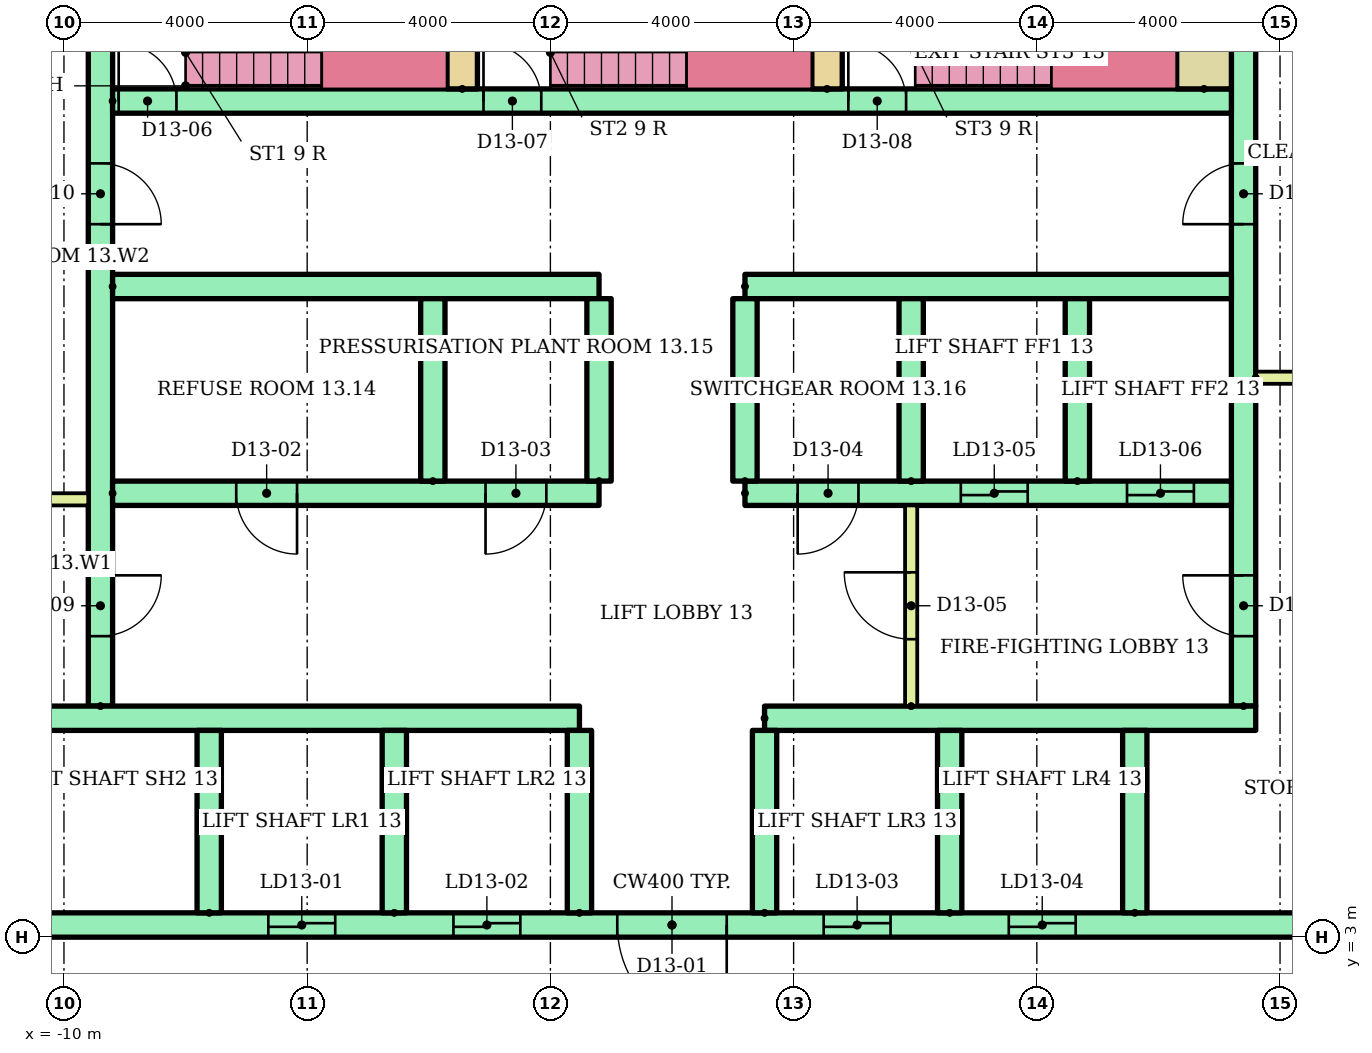
"""IFC4 building model, lengths in metres.
Left out: names, types, materials, properties, quantities, classifications, styles, units other than length and angle.
Written with IfcOpenShell. Run it as: python <this file> out.ifc"""

import sys

from ifc_helpers import new_model, si_unit, direction, frame, frame_2d, origin, place, context, subcontext, project, spatial, rectangle, extrude, element, fill, save


model = new_model("IFC4")
c1 = context("Model", 3, precision=1e-05, world=origin(), true_north=direction((0.0, 1.0)))
c2 = subcontext(c1, "Body", "Model", "MODEL_VIEW")
j1 = project(units=[si_unit("LENGTHUNIT", "METRE"), si_unit("PLANEANGLEUNIT", "RADIAN")], contexts=[c1])
p1 = place(None, origin())
s1 = spatial("IfcSite", under=j1, at=p1, CompositionType="ELEMENT")
p2 = place(p1, origin())
s2 = spatial("IfcBuilding", under=s1, at=p2, CompositionType="ELEMENT")
p3 = place(p2, frame((0.0, 0.0, 51.2)))
s3 = spatial("IfcBuildingStorey", under=s2, at=p3, CompositionType="ELEMENT", Elevation=51.2)
p4 = place(p3, frame((-9.4, 6.8, 0.0), z_axis=(0.0, 0.0, 1.0), x_axis=(0.0, 1.0, 0.0)))
e1 = element("IfcWall", 1, at=p4, inside=s3, PredefinedType="SHEAR", context=c2, shape_type="SweptSolid", body=[
    extrude(rectangle(XDim=12.7, YDim=0.4, at=frame_2d((6.35, 0.0))), origin(), (0.0, 0.0, 1.0), 2.92),
])
p5 = place(p4, frame((1.15, 0.0, 0.0)))
e2 = element("IfcOpeningElement", 2, at=p5, cuts=e1, PredefinedType="OPENING", context=c2, shape_type="SweptSolid", body=[
    extrude(rectangle(XDim=1.0, YDim=2.1, at=frame_2d((0.5, 1.05))), frame((0.0, 0.21, 0.0), z_axis=(0.0, -1.0, 0.0), x_axis=(1.0, 0.0, 0.0)), (0.0, 0.0, 1.0), 0.42),
])
p6 = place(p4, frame((7.925, 0.0, 0.0)))
e3 = element("IfcOpeningElement", 3, at=p6, cuts=e1, PredefinedType="OPENING", context=c2, shape_type="SweptSolid", body=[
    extrude(rectangle(XDim=1.0, YDim=2.1, at=frame_2d((0.5, 1.05))), frame((0.0, 0.21, 0.0), z_axis=(0.0, -1.0, 0.0), x_axis=(1.0, 0.0, 0.0)), (0.0, 0.0, 1.0), 0.42),
])
p7 = place(p3, frame((9.4, 6.8, 0.0), z_axis=(0.0, 0.0, 1.0), x_axis=(0.0, 1.0, 0.0)))
e4 = element("IfcWall", 4, at=p7, inside=s3, PredefinedType="SHEAR", context=c2, shape_type="SweptSolid", body=[
    extrude(rectangle(XDim=12.7, YDim=0.4, at=frame_2d((6.35, 0.0))), origin(), (0.0, 0.0, 1.0), 2.92),
])
p8 = place(p7, frame((1.15, 0.0, 0.0)))
e5 = element("IfcOpeningElement", 5, at=p8, cuts=e4, PredefinedType="OPENING", context=c2, shape_type="SweptSolid", body=[
    extrude(rectangle(XDim=1.0, YDim=2.1, at=frame_2d((0.5, 1.05))), frame((0.0, 0.21, 0.0), z_axis=(0.0, -1.0, 0.0), x_axis=(1.0, 0.0, 0.0)), (0.0, 0.0, 1.0), 0.42),
])
p9 = place(p7, frame((7.925, 0.0, 0.0)))
e6 = element("IfcOpeningElement", 6, at=p9, cuts=e4, PredefinedType="OPENING", context=c2, shape_type="SweptSolid", body=[
    extrude(rectangle(XDim=1.0, YDim=2.1, at=frame_2d((0.5, 1.05))), frame((0.0, 0.21, 0.0), z_axis=(0.0, -1.0, 0.0), x_axis=(1.0, 0.0, 0.0)), (0.0, 0.0, 1.0), 0.42),
])
p10 = place(p3, frame((-13.5, 3.2, 0.0)))
e7 = element("IfcWall", 7, at=p10, inside=s3, PredefinedType="SHEAR", context=c2, shape_type="SweptSolid", body=[
    extrude(rectangle(XDim=27.0, YDim=0.4, at=frame_2d((13.5, 0.0))), origin(), (0.0, 0.0, 1.0), 2.92),
])
p11 = place(p10, frame((6.861, 0.0, 0.0)))
e8 = element("IfcOpeningElement", 8, at=p11, cuts=e7, PredefinedType="OPENING", context=c2, shape_type="SweptSolid", body=[
    extrude(rectangle(XDim=1.1, YDim=2.1, at=frame_2d((0.55, 1.05))), frame((0.0, 0.21, 0.0), z_axis=(0.0, -1.0, 0.0), x_axis=(1.0, 0.0, 0.0)), (0.0, 0.0, 1.0), 0.42),
])
p12 = place(p10, frame((9.906, 0.0, 0.0)))
e9 = element("IfcOpeningElement", 9, at=p12, cuts=e7, PredefinedType="OPENING", context=c2, shape_type="SweptSolid", body=[
    extrude(rectangle(XDim=1.1, YDim=2.1, at=frame_2d((0.55, 1.05))), frame((0.0, 0.21, 0.0), z_axis=(0.0, -1.0, 0.0), x_axis=(1.0, 0.0, 0.0)), (0.0, 0.0, 1.0), 0.42),
])
p13 = place(p10, frame((15.994, 0.0, 0.0)))
e10 = element("IfcOpeningElement", 10, at=p13, cuts=e7, PredefinedType="OPENING", context=c2, shape_type="SweptSolid", body=[
    extrude(rectangle(XDim=1.1, YDim=2.1, at=frame_2d((0.55, 1.05))), frame((0.0, 0.21, 0.0), z_axis=(0.0, -1.0, 0.0), x_axis=(1.0, 0.0, 0.0)), (0.0, 0.0, 1.0), 0.42),
])
p14 = place(p10, frame((19.039, 0.0, 0.0)))
e11 = element("IfcOpeningElement", 11, at=p14, cuts=e7, PredefinedType="OPENING", context=c2, shape_type="SweptSolid", body=[
    extrude(rectangle(XDim=1.1, YDim=2.1, at=frame_2d((0.55, 1.05))), frame((0.0, 0.21, 0.0), z_axis=(0.0, -1.0, 0.0), x_axis=(1.0, 0.0, 0.0)), (0.0, 0.0, 1.0), 0.42),
])
p15 = place(p10, frame((12.6, 0.0, 0.0)))
e12 = element("IfcOpeningElement", 12, at=p15, cuts=e7, PredefinedType="OPENING", context=c2, shape_type="SweptSolid", body=[
    extrude(rectangle(XDim=1.8, YDim=2.1, at=frame_2d((0.9, 1.05))), frame((0.0, 0.21, 0.0), z_axis=(0.0, -1.0, 0.0), x_axis=(1.0, 0.0, 0.0)), (0.0, 0.0, 1.0), 0.42),
])
p16 = place(p3, frame((-13.5, 6.6, 0.0)))
e13 = element("IfcWall", 13, at=p16, inside=s3, PredefinedType="SHEAR", context=c2, shape_type="SweptSolid", body=[
    extrude(rectangle(XDim=11.978, YDim=0.4, at=frame_2d((5.989, 0.0))), origin(), (0.0, 0.0, 1.0), 2.92),
])
p17 = place(p3, frame((1.522, 6.6, 0.0)))
e14 = element("IfcWall", 14, at=p17, inside=s3, PredefinedType="SHEAR", context=c2, shape_type="SweptSolid", body=[
    extrude(rectangle(XDim=8.078, YDim=0.4, at=frame_2d((4.039, 0.0))), origin(), (0.0, 0.0, 1.0), 2.92),
])
for number, where, z_axis, x_axis in (
    (15, (-7.611, 3.4, 0.0), (0.0, 0.0, 1.0), (0.0, 1.0, 0.0)),
    (16, (-4.567, 3.4, 0.0), (0.0, 0.0, 1.0), (0.0, 1.0, 0.0)),
    (17, (-1.522, 3.4, 0.0), (0.0, 0.0, 1.0), (0.0, 1.0, 0.0)),
    (18, (1.522, 3.4, 0.0), (0.0, 0.0, 1.0), (0.0, 1.0, 0.0)),
    (19, (4.567, 3.4, 0.0), (0.0, 0.0, 1.0), (0.0, 1.0, 0.0)),
    (20, (7.611, 3.4, 0.0), (0.0, 0.0, 1.0), (0.0, 1.0, 0.0)),
):
    element("IfcWall", number, at=place(p3, frame(where, z_axis=z_axis, x_axis=x_axis)), inside=s3, PredefinedType="SHEAR", context=c2, shape_type="SweptSolid", body=[
        extrude(rectangle(XDim=3.0, YDim=0.4, at=frame_2d((1.5, 0.0))), origin(), (0.0, 0.0, 1.0), 2.92),
    ])
p18 = place(p3, frame((-9.2, 10.3, 0.0)))
e21 = element("IfcWall", 21, at=p18, inside=s3, PredefinedType="SHEAR", context=c2, shape_type="SweptSolid", body=[
    extrude(rectangle(XDim=8.0, YDim=0.4, at=frame_2d((4.0, 0.0))), origin(), (0.0, 0.0, 1.0), 2.92),
])
p19 = place(p18, frame((2.033, 0.0, 0.0)))
e22 = element("IfcOpeningElement", 22, at=p19, cuts=e21, PredefinedType="OPENING", context=c2, shape_type="SweptSolid", body=[
    extrude(rectangle(XDim=1.0, YDim=2.1, at=frame_2d((0.5, 1.05))), frame((0.0, 0.21, 0.0), z_axis=(0.0, -1.0, 0.0), x_axis=(1.0, 0.0, 0.0)), (0.0, 0.0, 1.0), 0.42),
])
p20 = place(p18, frame((6.133, 0.0, 0.0)))
e23 = element("IfcOpeningElement", 23, at=p20, cuts=e21, PredefinedType="OPENING", context=c2, shape_type="SweptSolid", body=[
    extrude(rectangle(XDim=1.0, YDim=2.1, at=frame_2d((0.5, 1.05))), frame((0.0, 0.21, 0.0), z_axis=(0.0, -1.0, 0.0), x_axis=(1.0, 0.0, 0.0)), (0.0, 0.0, 1.0), 0.42),
])
p21 = place(p3, frame((-9.2, 13.7, 0.0)))
e24 = element("IfcWall", 24, at=p21, inside=s3, PredefinedType="SHEAR", context=c2, shape_type="SweptSolid", body=[
    extrude(rectangle(XDim=8.0, YDim=0.4, at=frame_2d((4.0, 0.0))), origin(), (0.0, 0.0, 1.0), 2.92),
])
p22 = place(p3, frame((1.2, 10.3, 0.0)))
e25 = element("IfcWall", 25, at=p22, inside=s3, PredefinedType="SHEAR", context=c2, shape_type="SweptSolid", body=[
    extrude(rectangle(XDim=8.0, YDim=0.4, at=frame_2d((4.0, 0.0))), origin(), (0.0, 0.0, 1.0), 2.92),
])
p23 = place(p22, frame((3.55, 0.0, 0.0)))
e26 = element("IfcOpeningElement", 26, at=p23, cuts=e25, PredefinedType="OPENING", context=c2, shape_type="SweptSolid", body=[
    extrude(rectangle(XDim=1.1, YDim=2.1, at=frame_2d((0.55, 1.05))), frame((0.0, 0.21, 0.0), z_axis=(0.0, -1.0, 0.0), x_axis=(1.0, 0.0, 0.0)), (0.0, 0.0, 1.0), 0.42),
])
p24 = place(p22, frame((6.283, 0.0, 0.0)))
e27 = element("IfcOpeningElement", 27, at=p24, cuts=e25, PredefinedType="OPENING", context=c2, shape_type="SweptSolid", body=[
    extrude(rectangle(XDim=1.1, YDim=2.1, at=frame_2d((0.55, 1.05))), frame((0.0, 0.21, 0.0), z_axis=(0.0, -1.0, 0.0), x_axis=(1.0, 0.0, 0.0)), (0.0, 0.0, 1.0), 0.42),
])
p25 = place(p22, frame((0.867, 0.0, 0.0)))
e28 = element("IfcOpeningElement", 28, at=p25, cuts=e25, PredefinedType="OPENING", context=c2, shape_type="SweptSolid", body=[
    extrude(rectangle(XDim=1.0, YDim=2.1, at=frame_2d((0.5, 1.05))), frame((0.0, 0.21, 0.0), z_axis=(0.0, -1.0, 0.0), x_axis=(1.0, 0.0, 0.0)), (0.0, 0.0, 1.0), 0.42),
])
p26 = place(p3, frame((1.2, 13.7, 0.0)))
e29 = element("IfcWall", 29, at=p26, inside=s3, PredefinedType="SHEAR", context=c2, shape_type="SweptSolid", body=[
    extrude(rectangle(XDim=8.0, YDim=0.4, at=frame_2d((4.0, 0.0))), origin(), (0.0, 0.0, 1.0), 2.92),
])
for number, where, z_axis, x_axis in (
    (30, (-3.933, 10.5, 0.0), (0.0, 0.0, 1.0), (0.0, 1.0, 0.0)),
    (31, (-1.2, 10.5, 0.0), (0.0, 0.0, 1.0), (0.0, 1.0, 0.0)),
    (32, (1.2, 10.5, 0.0), (0.0, 0.0, 1.0), (0.0, 1.0, 0.0)),
    (33, (3.933, 10.5, 0.0), (0.0, 0.0, 1.0), (0.0, 1.0, 0.0)),
    (34, (6.667, 10.5, 0.0), (0.0, 0.0, 1.0), (0.0, 1.0, 0.0)),
):
    element("IfcWall", number, at=place(p3, frame(where, z_axis=z_axis, x_axis=x_axis)), inside=s3, PredefinedType="SHEAR", context=c2, shape_type="SweptSolid", body=[
        extrude(rectangle(XDim=3.0, YDim=0.4, at=frame_2d((1.5, 0.0))), origin(), (0.0, 0.0, 1.0), 2.92),
    ])
p27 = place(p3, frame((3.933, 6.8, 0.0), z_axis=(0.0, 0.0, 1.0), x_axis=(0.0, 1.0, 0.0)))
e35 = element("IfcWall", 35, at=p27, inside=s3, PredefinedType="PARTITIONING", context=c2, shape_type="SweptSolid", body=[
    extrude(rectangle(XDim=3.3, YDim=0.2, at=frame_2d((1.65, 0.0))), origin(), (0.0, 0.0, 1.0), 2.92),
])
p28 = place(p27, frame((1.1, 0.0, 0.0)))
e36 = element("IfcOpeningElement", 36, at=p28, cuts=e35, PredefinedType="OPENING", context=c2, shape_type="SweptSolid", body=[
    extrude(rectangle(XDim=1.1, YDim=2.1, at=frame_2d((0.55, 1.05))), frame((0.0, 0.11, 0.0), z_axis=(0.0, -1.0, 0.0), x_axis=(1.0, 0.0, 0.0)), (0.0, 0.0, 1.0), 0.22),
])
p29 = place(p3, frame((-9.2, 16.75, 0.0)))
e37 = element("IfcWall", 37, at=p29, inside=s3, PredefinedType="SHEAR", context=c2, shape_type="SweptSolid", body=[
    extrude(rectangle(XDim=18.4, YDim=0.4, at=frame_2d((9.2, 0.0))), origin(), (0.0, 0.0, 1.0), 2.92),
])
p30 = place(p29, frame((0.1, 0.0, 0.0)))
e38 = element("IfcOpeningElement", 38, at=p30, cuts=e37, PredefinedType="OPENING", context=c2, shape_type="SweptSolid", body=[
    extrude(rectangle(XDim=0.95, YDim=2.1, at=frame_2d((0.475, 1.05))), frame((0.0, 0.21, 0.0), z_axis=(0.0, -1.0, 0.0), x_axis=(1.0, 0.0, 0.0)), (0.0, 0.0, 1.0), 0.42),
])
p31 = place(p29, frame((6.1, 0.0, 0.0)))
e39 = element("IfcOpeningElement", 39, at=p31, cuts=e37, PredefinedType="OPENING", context=c2, shape_type="SweptSolid", body=[
    extrude(rectangle(XDim=0.95, YDim=2.1, at=frame_2d((0.475, 1.05))), frame((0.0, 0.21, 0.0), z_axis=(0.0, -1.0, 0.0), x_axis=(1.0, 0.0, 0.0)), (0.0, 0.0, 1.0), 0.42),
])
p32 = place(p29, frame((12.1, 0.0, 0.0)))
e40 = element("IfcOpeningElement", 40, at=p32, cuts=e37, PredefinedType="OPENING", context=c2, shape_type="SweptSolid", body=[
    extrude(rectangle(XDim=0.95, YDim=2.1, at=frame_2d((0.475, 1.05))), frame((0.0, 0.21, 0.0), z_axis=(0.0, -1.0, 0.0), x_axis=(1.0, 0.0, 0.0)), (0.0, 0.0, 1.0), 0.42),
])
for number, where, z_axis, x_axis in (
    (41, (-3.45, 16.95, 0.0), (0.0, 0.0, 1.0), (0.0, 1.0, 0.0)),
    (42, (2.55, 16.95, 0.0), (0.0, 0.0, 1.0), (0.0, 1.0, 0.0)),
):
    element("IfcWall", number, at=place(p3, frame(where, z_axis=z_axis, x_axis=x_axis)), inside=s3, PredefinedType="SHEAR", context=c2, shape_type="SweptSolid", body=[
        extrude(rectangle(XDim=2.55, YDim=0.5, at=frame_2d((1.275, 0.0))), origin(), (0.0, 0.0, 1.0), 2.92),
    ])
p33 = place(p3, frame((8.75, 16.95, 0.0), z_axis=(0.0, 0.0, 1.0), x_axis=(0.0, 1.0, 0.0)))
e43 = element("IfcWall", 43, at=p33, inside=s3, PredefinedType="SHEAR", context=c2, shape_type="SweptSolid", body=[
    extrude(rectangle(XDim=2.55, YDim=0.9, at=frame_2d((1.275, 0.0))), origin(), (0.0, 0.0, 1.0), 2.92),
])
for number, where in (
    (44, (-13.5, 10.2, 0.0)),
    (45, (9.6, 12.2, 0.0)),
):
    element("IfcWall", number, at=place(p3, frame(where)), inside=s3, PredefinedType="PARTITIONING", context=c2, shape_type="SweptSolid", body=[
        extrude(rectangle(XDim=3.9, YDim=0.2, at=frame_2d((1.95, 0.0))), origin(), (0.0, 0.0, 1.0), 2.92),
    ])
p34 = place(p11, origin())
e46 = element("IfcDoor", 46, at=p34, inside=s3, OperationType="SLIDING_TO_LEFT", PredefinedType="DOOR", context=c2, shape_type="SweptSolid", body=[
    extrude(rectangle(XDim=1.1, YDim=2.1, at=frame_2d((0.55, 1.05))), frame((0.0, 0.025, 0.0), z_axis=(0.0, -1.0, 0.0), x_axis=(1.0, 0.0, 0.0)), (0.0, 0.0, 1.0), 0.05),
])
fill(e8, e46)
p35 = place(p12, origin())
e47 = element("IfcDoor", 47, at=p35, inside=s3, OperationType="SLIDING_TO_LEFT", PredefinedType="DOOR", context=c2, shape_type="SweptSolid", body=[
    extrude(rectangle(XDim=1.1, YDim=2.1, at=frame_2d((0.55, 1.05))), frame((0.0, 0.025, 0.0), z_axis=(0.0, -1.0, 0.0), x_axis=(1.0, 0.0, 0.0)), (0.0, 0.0, 1.0), 0.05),
])
fill(e9, e47)
p36 = place(p13, origin())
e48 = element("IfcDoor", 48, at=p36, inside=s3, OperationType="SLIDING_TO_LEFT", PredefinedType="DOOR", context=c2, shape_type="SweptSolid", body=[
    extrude(rectangle(XDim=1.1, YDim=2.1, at=frame_2d((0.55, 1.05))), frame((0.0, 0.025, 0.0), z_axis=(0.0, -1.0, 0.0), x_axis=(1.0, 0.0, 0.0)), (0.0, 0.0, 1.0), 0.05),
])
fill(e10, e48)
p37 = place(p14, origin())
e49 = element("IfcDoor", 49, at=p37, inside=s3, OperationType="SLIDING_TO_LEFT", PredefinedType="DOOR", context=c2, shape_type="SweptSolid", body=[
    extrude(rectangle(XDim=1.1, YDim=2.1, at=frame_2d((0.55, 1.05))), frame((0.0, 0.025, 0.0), z_axis=(0.0, -1.0, 0.0), x_axis=(1.0, 0.0, 0.0)), (0.0, 0.0, 1.0), 0.05),
])
fill(e11, e49)
p38 = place(p15, frame((1.8, 0.0, 0.0), z_axis=(0.0, 0.0, 1.0), x_axis=(-1.0, 0.0, 0.0)))
e50 = element("IfcDoor", 50, at=p38, inside=s3, OperationType="DOUBLE_DOOR_SINGLE_SWING", PredefinedType="DOOR", context=c2, shape_type="SweptSolid", body=[
    extrude(rectangle(XDim=1.8, YDim=2.1, at=frame_2d((0.9, 1.05))), frame((0.0, 0.025, 0.0), z_axis=(0.0, -1.0, 0.0), x_axis=(1.0, 0.0, 0.0)), (0.0, 0.0, 1.0), 0.05),
])
fill(e12, e50)
p39 = place(p23, origin())
e51 = element("IfcDoor", 51, at=p39, inside=s3, OperationType="SLIDING_TO_LEFT", PredefinedType="DOOR", context=c2, shape_type="SweptSolid", body=[
    extrude(rectangle(XDim=1.1, YDim=2.1, at=frame_2d((0.55, 1.05))), frame((0.0, 0.025, 0.0), z_axis=(0.0, -1.0, 0.0), x_axis=(1.0, 0.0, 0.0)), (0.0, 0.0, 1.0), 0.05),
])
fill(e26, e51)
p40 = place(p24, origin())
e52 = element("IfcDoor", 52, at=p40, inside=s3, OperationType="SLIDING_TO_LEFT", PredefinedType="DOOR", context=c2, shape_type="SweptSolid", body=[
    extrude(rectangle(XDim=1.1, YDim=2.1, at=frame_2d((0.55, 1.05))), frame((0.0, 0.025, 0.0), z_axis=(0.0, -1.0, 0.0), x_axis=(1.0, 0.0, 0.0)), (0.0, 0.0, 1.0), 0.05),
])
fill(e27, e52)
p41 = place(p19, frame((1.0, 0.0, 0.0), z_axis=(0.0, 0.0, 1.0), x_axis=(-1.0, 0.0, 0.0)))
e53 = element("IfcDoor", 53, at=p41, inside=s3, OperationType="SINGLE_SWING_RIGHT", PredefinedType="DOOR", context=c2, shape_type="SweptSolid", body=[
    extrude(rectangle(XDim=1.0, YDim=2.1, at=frame_2d((0.5, 1.05))), frame((0.0, 0.025, 0.0), z_axis=(0.0, -1.0, 0.0), x_axis=(1.0, 0.0, 0.0)), (0.0, 0.0, 1.0), 0.05),
])
fill(e22, e53)
p42 = place(p20, frame((1.0, 0.0, 0.0), z_axis=(0.0, 0.0, 1.0), x_axis=(-1.0, 0.0, 0.0)))
e54 = element("IfcDoor", 54, at=p42, inside=s3, OperationType="SINGLE_SWING_LEFT", PredefinedType="DOOR", context=c2, shape_type="SweptSolid", body=[
    extrude(rectangle(XDim=1.0, YDim=2.1, at=frame_2d((0.5, 1.05))), frame((0.0, 0.025, 0.0), z_axis=(0.0, -1.0, 0.0), x_axis=(1.0, 0.0, 0.0)), (0.0, 0.0, 1.0), 0.05),
])
fill(e23, e54)
p43 = place(p25, frame((1.0, 0.0, 0.0), z_axis=(0.0, 0.0, 1.0), x_axis=(-1.0, 0.0, 0.0)))
e55 = element("IfcDoor", 55, at=p43, inside=s3, OperationType="SINGLE_SWING_LEFT", PredefinedType="DOOR", context=c2, shape_type="SweptSolid", body=[
    extrude(rectangle(XDim=1.0, YDim=2.1, at=frame_2d((0.5, 1.05))), frame((0.0, 0.025, 0.0), z_axis=(0.0, -1.0, 0.0), x_axis=(1.0, 0.0, 0.0)), (0.0, 0.0, 1.0), 0.05),
])
fill(e28, e55)
p44 = place(p28, origin())
e56 = element("IfcDoor", 56, at=p44, inside=s3, OperationType="SINGLE_SWING_RIGHT", PredefinedType="DOOR", context=c2, shape_type="SweptSolid", body=[
    extrude(rectangle(XDim=1.1, YDim=2.1, at=frame_2d((0.55, 1.05))), frame((0.0, 0.025, 0.0), z_axis=(0.0, -1.0, 0.0), x_axis=(1.0, 0.0, 0.0)), (0.0, 0.0, 1.0), 0.05),
])
fill(e36, e56)
p45 = place(p30, origin())
e57 = element("IfcDoor", 57, at=p45, inside=s3, OperationType="SINGLE_SWING_LEFT", PredefinedType="DOOR", context=c2, shape_type="SweptSolid", body=[
    extrude(rectangle(XDim=0.95, YDim=2.1, at=frame_2d((0.475, 1.05))), frame((0.0, 0.025, 0.0), z_axis=(0.0, -1.0, 0.0), x_axis=(1.0, 0.0, 0.0)), (0.0, 0.0, 1.0), 0.05),
])
fill(e38, e57)
p46 = place(p31, origin())
e58 = element("IfcDoor", 58, at=p46, inside=s3, OperationType="SINGLE_SWING_LEFT", PredefinedType="DOOR", context=c2, shape_type="SweptSolid", body=[
    extrude(rectangle(XDim=0.95, YDim=2.1, at=frame_2d((0.475, 1.05))), frame((0.0, 0.025, 0.0), z_axis=(0.0, -1.0, 0.0), x_axis=(1.0, 0.0, 0.0)), (0.0, 0.0, 1.0), 0.05),
])
fill(e39, e58)
p47 = place(p32, origin())
e59 = element("IfcDoor", 59, at=p47, inside=s3, OperationType="SINGLE_SWING_LEFT", PredefinedType="DOOR", context=c2, shape_type="SweptSolid", body=[
    extrude(rectangle(XDim=0.95, YDim=2.1, at=frame_2d((0.475, 1.05))), frame((0.0, 0.025, 0.0), z_axis=(0.0, -1.0, 0.0), x_axis=(1.0, 0.0, 0.0)), (0.0, 0.0, 1.0), 0.05),
])
fill(e40, e59)
p48 = place(p5, frame((1.0, 0.0, 0.0), z_axis=(0.0, 0.0, 1.0), x_axis=(-1.0, 0.0, 0.0)))
e60 = element("IfcDoor", 60, at=p48, inside=s3, OperationType="SINGLE_SWING_RIGHT", PredefinedType="DOOR", context=c2, shape_type="SweptSolid", body=[
    extrude(rectangle(XDim=1.0, YDim=2.1, at=frame_2d((0.5, 1.05))), frame((0.0, 0.025, 0.0), z_axis=(0.0, -1.0, 0.0), x_axis=(1.0, 0.0, 0.0)), (0.0, 0.0, 1.0), 0.05),
])
fill(e2, e60)
p49 = place(p6, frame((1.0, 0.0, 0.0), z_axis=(0.0, 0.0, 1.0), x_axis=(-1.0, 0.0, 0.0)))
e61 = element("IfcDoor", 61, at=p49, inside=s3, OperationType="SINGLE_SWING_LEFT", PredefinedType="DOOR", context=c2, shape_type="SweptSolid", body=[
    extrude(rectangle(XDim=1.0, YDim=2.1, at=frame_2d((0.5, 1.05))), frame((0.0, 0.025, 0.0), z_axis=(0.0, -1.0, 0.0), x_axis=(1.0, 0.0, 0.0)), (0.0, 0.0, 1.0), 0.05),
])
fill(e3, e61)
p50 = place(p8, origin())
e62 = element("IfcDoor", 62, at=p50, inside=s3, OperationType="SINGLE_SWING_RIGHT", PredefinedType="DOOR", context=c2, shape_type="SweptSolid", body=[
    extrude(rectangle(XDim=1.0, YDim=2.1, at=frame_2d((0.5, 1.05))), frame((0.0, 0.025, 0.0), z_axis=(0.0, -1.0, 0.0), x_axis=(1.0, 0.0, 0.0)), (0.0, 0.0, 1.0), 0.05),
])
fill(e5, e62)
p51 = place(p9, origin())
e63 = element("IfcDoor", 63, at=p51, inside=s3, OperationType="SINGLE_SWING_LEFT", PredefinedType="DOOR", context=c2, shape_type="SweptSolid", body=[
    extrude(rectangle(XDim=1.0, YDim=2.1, at=frame_2d((0.5, 1.05))), frame((0.0, 0.025, 0.0), z_axis=(0.0, -1.0, 0.0), x_axis=(1.0, 0.0, 0.0)), (0.0, 0.0, 1.0), 0.05),
])
fill(e6, e63)
save(model, sys.argv[1])
